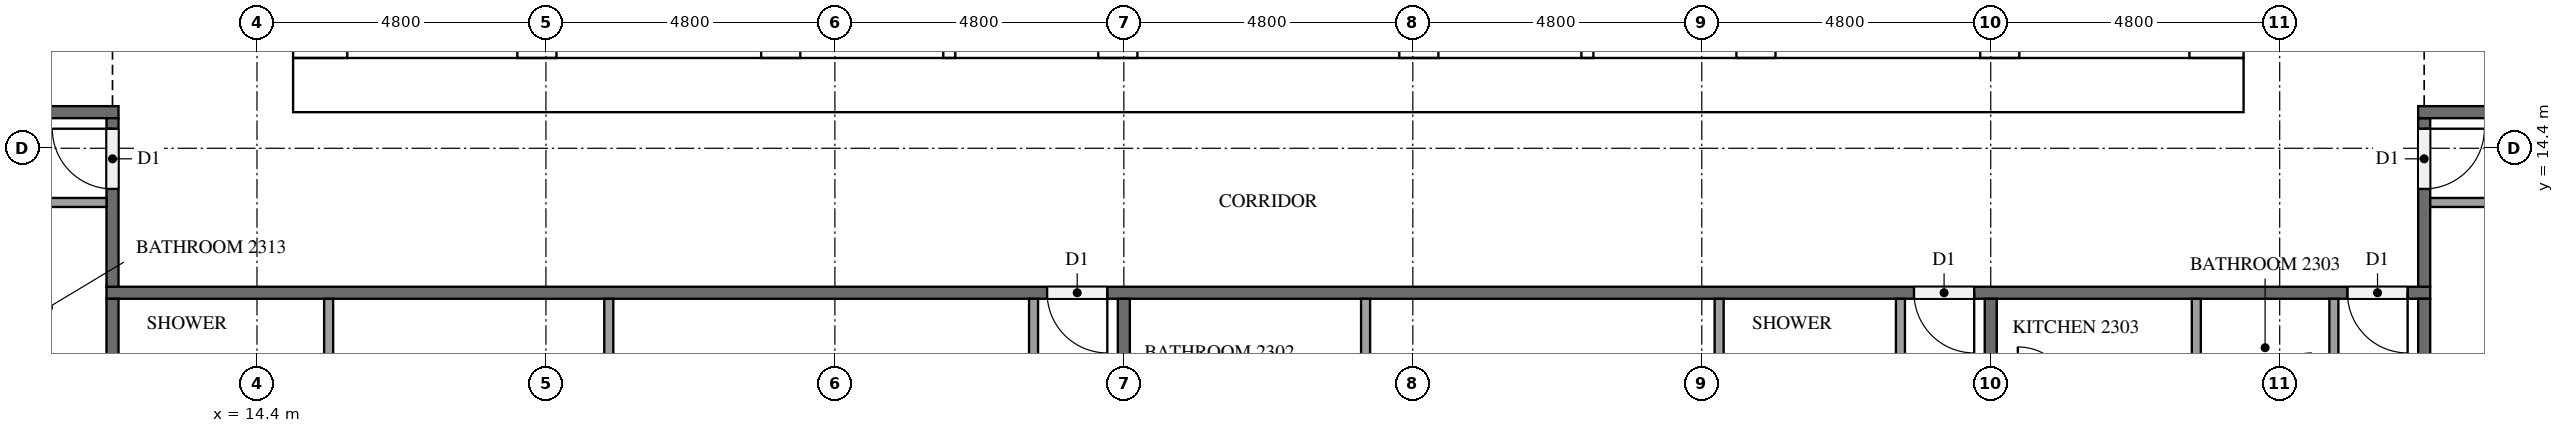
"""IFC4 building model, lengths in metres.
Left out: names, types, materials, properties, quantities, classifications, styles, units other than length and angle.
Written with IfcOpenShell. Run it as: python <this file> out.ifc"""

import sys

from ifc_helpers import new_model, si_unit, direction, frame, frame_2d, origin, place, context, subcontext, project, spatial, rectangle, extrude, element, fill, save


model = new_model("IFC4")
c1 = context("Model", 3, precision=1e-05, world=origin(), true_north=direction((0.0, 1.0)))
c2 = subcontext(c1, "Body", "Model", "MODEL_VIEW")
j1 = project(units=[si_unit("LENGTHUNIT", "METRE"), si_unit("PLANEANGLEUNIT", "RADIAN")], contexts=[c1])
p1 = place(None, origin())
s1 = spatial("IfcSite", under=j1, at=p1, CompositionType="ELEMENT")
p2 = place(p1, origin())
s2 = spatial("IfcBuilding", under=s1, at=p2, CompositionType="ELEMENT")
p3 = place(p2, frame((0.0, 0.0, 92.7)))
s3 = spatial("IfcBuildingStorey", under=s2, at=p3, CompositionType="ELEMENT", Elevation=92.7)
p4 = place(p3, frame((15.0, 15.45, 0.0), z_axis=(0.0, 0.0, 1.0), x_axis=(1.0, 0.0, 0.0)))
e1 = element("IfcWall", 1, at=p4, inside=s3, PredefinedType="SHEAR", context=c2, shape_type="SweptSolid", body=[
    extrude(rectangle(XDim=32.4, YDim=0.9, at=frame_2d((16.2, 0.0))), origin(), (0.0, 0.0, 1.0), 3.2),
])
p5 = place(p4, frame((15.3, 0.0, 0.0)))
e2 = element("IfcOpeningElement", 2, at=p5, cuts=e1, PredefinedType="OPENING", context=c2, shape_type="SweptSolid", body=[
    extrude(rectangle(XDim=1.8, YDim=2.1, at=frame_2d((0.9, 1.05))), frame((0.0, 0.46, 0.0), z_axis=(0.0, -1.0, 0.0), x_axis=(1.0, 0.0, 0.0)), (0.0, 0.0, 1.0), 0.92),
])
p6 = place(p3, frame((15.45, 15.9, 0.0), z_axis=(0.0, 0.0, 1.0), x_axis=(0.0, 1.0, 0.0)))
e3 = element("IfcWall", 3, at=p6, inside=s3, PredefinedType="SHEAR", context=c2, shape_type="SweptSolid", body=[
    extrude(rectangle(XDim=21.0, YDim=0.9, at=frame_2d((10.5, 0.0))), origin(), (0.0, 0.0, 1.0), 3.2),
])
p7 = place(p6, frame((4.86, 0.0, 0.0)))
e4 = element("IfcOpeningElement", 4, at=p7, cuts=e3, PredefinedType="OPENING", context=c2, shape_type="SweptSolid", body=[
    extrude(rectangle(XDim=1.2, YDim=2.1, at=frame_2d((0.6, 1.05))), frame((0.0, 0.46, 0.0), z_axis=(0.0, -1.0, 0.0), x_axis=(1.0, 0.0, 0.0)), (0.0, 0.0, 1.0), 0.92),
])
p8 = place(p3, frame((46.95, 15.9, 0.0), z_axis=(0.0, 0.0, 1.0), x_axis=(0.0, 1.0, 0.0)))
e5 = element("IfcWall", 5, at=p8, inside=s3, PredefinedType="SHEAR", context=c2, shape_type="SweptSolid", body=[
    extrude(rectangle(XDim=21.0, YDim=0.9, at=frame_2d((10.5, 0.0))), origin(), (0.0, 0.0, 1.0), 3.2),
])
p9 = place(p8, frame((10.2, 0.0, 0.0)))
e6 = element("IfcOpeningElement", 6, at=p9, cuts=e5, PredefinedType="OPENING", context=c2, shape_type="SweptSolid", body=[
    extrude(rectangle(XDim=1.2, YDim=2.1, at=frame_2d((0.6, 1.05))), frame((0.0, 0.46, 0.0), z_axis=(0.0, -1.0, 0.0), x_axis=(1.0, 0.0, 0.0)), (0.0, 0.0, 1.0), 0.92),
])
p10 = place(p3, frame((19.05, 15.9, 0.0), z_axis=(0.0, 0.0, 1.0), x_axis=(0.0, 1.0, 0.0)))
e7 = element("IfcWall", 7, at=p10, inside=s3, PredefinedType="SHEAR", context=c2, shape_type="SweptSolid", body=[
    extrude(rectangle(XDim=15.025, YDim=0.65, at=frame_2d((7.513, 0.0))), origin(), (0.0, 0.0, 1.0), 3.2),
])
p11 = place(p10, frame((9.55, 0.0, 0.0)))
e8 = element("IfcOpeningElement", 8, at=p11, cuts=e7, PredefinedType="OPENING", context=c2, shape_type="SweptSolid", body=[
    extrude(rectangle(XDim=1.1, YDim=2.1, at=frame_2d((0.55, 1.05))), frame((0.0, 0.335, 0.0), z_axis=(0.0, -1.0, 0.0), x_axis=(1.0, 0.0, 0.0)), (0.0, 0.0, 1.0), 0.67),
])
p12 = place(p10, frame((13.05, 0.0, 0.0)))
e9 = element("IfcOpeningElement", 9, at=p12, cuts=e7, PredefinedType="OPENING", context=c2, shape_type="SweptSolid", body=[
    extrude(rectangle(XDim=1.1, YDim=2.1, at=frame_2d((0.55, 1.05))), frame((0.0, 0.335, 0.0), z_axis=(0.0, -1.0, 0.0), x_axis=(1.0, 0.0, 0.0)), (0.0, 0.0, 1.0), 0.67),
])
p13 = place(p10, frame((0.3, 0.0, 0.0)))
e10 = element("IfcOpeningElement", 10, at=p13, cuts=e7, PredefinedType="OPENING", context=c2, shape_type="SweptSolid", body=[
    extrude(rectangle(XDim=1.2, YDim=2.1, at=frame_2d((0.6, 1.05))), frame((0.0, 0.335, 0.0), z_axis=(0.0, -1.0, 0.0), x_axis=(1.0, 0.0, 0.0)), (0.0, 0.0, 1.0), 0.67),
])
p14 = place(p3, frame((23.1, 15.9, 0.0), z_axis=(0.0, 0.0, 1.0), x_axis=(0.0, 1.0, 0.0)))
e11 = element("IfcWall", 11, at=p14, inside=s3, PredefinedType="SHEAR", context=c2, shape_type="SweptSolid", body=[
    extrude(rectangle(XDim=21.0, YDim=0.65, at=frame_2d((10.5, 0.0))), origin(), (0.0, 0.0, 1.0), 3.2),
])
p15 = place(p3, frame((39.3, 15.9, 0.0), z_axis=(0.0, 0.0, 1.0), x_axis=(0.0, 1.0, 0.0)))
e12 = element("IfcWall", 12, at=p15, inside=s3, PredefinedType="SHEAR", context=c2, shape_type="SweptSolid", body=[
    extrude(rectangle(XDim=8.35, YDim=0.65, at=frame_2d((4.175, 0.0))), origin(), (0.0, 0.0, 1.0), 3.2),
])
p16 = place(p3, frame((43.35, 15.9, 0.0), z_axis=(0.0, 0.0, 1.0), x_axis=(0.0, 1.0, 0.0)))
e13 = element("IfcWall", 13, at=p16, inside=s3, PredefinedType="SHEAR", context=c2, shape_type="SweptSolid", body=[
    extrude(rectangle(XDim=8.35, YDim=0.65, at=frame_2d((4.175, 0.0))), origin(), (0.0, 0.0, 1.0), 3.2),
])
p17 = place(p16, frame((0.3, 0.0, 0.0)))
e14 = element("IfcOpeningElement", 14, at=p17, cuts=e13, PredefinedType="OPENING", context=c2, shape_type="SweptSolid", body=[
    extrude(rectangle(XDim=1.2, YDim=2.1, at=frame_2d((0.6, 1.05))), frame((0.0, 0.335, 0.0), z_axis=(0.0, -1.0, 0.0), x_axis=(1.0, 0.0, 0.0)), (0.0, 0.0, 1.0), 0.67),
])
for number, where, z_axis, x_axis in (
    (15, (28.7, 15.9, 0.0), (0.0, 0.0, 1.0), (0.0, 1.0, 0.0)),
    (16, (33.7, 15.9, 0.0), (0.0, 0.0, 1.0), (0.0, 1.0, 0.0)),
):
    element("IfcWall", number, at=place(p3, frame(where, z_axis=z_axis, x_axis=x_axis)), inside=s3, PredefinedType="SHEAR", context=c2, shape_type="SweptSolid", body=[
        extrude(rectangle(XDim=2.525, YDim=0.65, at=frame_2d((1.263, 0.0))), origin(), (0.0, 0.0, 1.0), 3.2),
    ])
for number, where, z_axis, x_axis in (
    (17, (25.9, 15.9, 0.0), (0.0, 0.0, 1.0), (0.0, 1.0, 0.0)),
    (18, (36.5, 15.9, 0.0), (0.0, 0.0, 1.0), (0.0, 1.0, 0.0)),
):
    element("IfcWall", number, at=place(p3, frame(where, z_axis=z_axis, x_axis=x_axis)), inside=s3, PredefinedType="SOLIDWALL", context=c2, shape_type="SweptSolid", body=[
        extrude(rectangle(XDim=2.525, YDim=0.2, at=frame_2d((1.263, 0.0))), origin(), (0.0, 0.0, 1.0), 3.2),
    ])
p18 = place(p3, frame((50.5, 12.0, 0.0), z_axis=(0.0, 0.0, 1.0), x_axis=(-1.0, 0.0, 0.0)))
e19 = element("IfcWall", 19, at=p18, inside=s3, PredefinedType="PARTITIONING", context=c2, shape_type="SweptSolid", body=[
    extrude(rectangle(XDim=38.6, YDim=0.2, at=frame_2d((19.3, 0.0))), origin(), (0.0, 0.0, 1.0), 3.2),
])
p19 = place(p18, frame((21.975, 0.0, 0.0)))
e20 = element("IfcOpeningElement", 20, at=p19, cuts=e19, PredefinedType="OPENING", context=c2, shape_type="SweptSolid", body=[
    extrude(rectangle(XDim=1.0, YDim=2.1, at=frame_2d((0.5, 1.05))), frame((0.0, 0.11, 0.0), z_axis=(0.0, -1.0, 0.0), x_axis=(1.0, 0.0, 0.0)), (0.0, 0.0, 1.0), 0.22),
])
p20 = place(p18, frame((7.575, 0.0, 0.0)))
e21 = element("IfcOpeningElement", 21, at=p20, cuts=e19, PredefinedType="OPENING", context=c2, shape_type="SweptSolid", body=[
    extrude(rectangle(XDim=1.0, YDim=2.1, at=frame_2d((0.5, 1.05))), frame((0.0, 0.11, 0.0), z_axis=(0.0, -1.0, 0.0), x_axis=(1.0, 0.0, 0.0)), (0.0, 0.0, 1.0), 0.22),
])
p21 = place(p18, frame((0.375, 0.0, 0.0)))
e22 = element("IfcOpeningElement", 22, at=p21, cuts=e19, PredefinedType="OPENING", context=c2, shape_type="SweptSolid", body=[
    extrude(rectangle(XDim=1.0, YDim=2.1, at=frame_2d((0.5, 1.05))), frame((0.0, 0.11, 0.0), z_axis=(0.0, -1.0, 0.0), x_axis=(1.0, 0.0, 0.0)), (0.0, 0.0, 1.0), 0.22),
])
p22 = place(p3, frame((50.4, 14.9, 0.0), z_axis=(0.0, 0.0, 1.0), x_axis=(0.0, -1.0, 0.0)))
e23 = element("IfcWall", 23, at=p22, inside=s3, PredefinedType="PARTITIONING", context=c2, shape_type="SweptSolid", body=[
    extrude(rectangle(XDim=2.8, YDim=0.2, at=frame_2d((1.4, 0.0))), origin(), (0.0, 0.0, 1.0), 3.2),
])
p23 = place(p22, frame((0.175, 0.0, 0.0)))
e24 = element("IfcOpeningElement", 24, at=p23, cuts=e23, PredefinedType="OPENING", context=c2, shape_type="SweptSolid", body=[
    extrude(rectangle(XDim=1.0, YDim=2.1, at=frame_2d((0.5, 1.05))), frame((0.0, 0.11, 0.0), z_axis=(0.0, -1.0, 0.0), x_axis=(1.0, 0.0, 0.0)), (0.0, 0.0, 1.0), 0.22),
])
p24 = place(p3, frame((50.3, 15.0, 0.0), z_axis=(0.0, 0.0, 1.0), x_axis=(1.0, 0.0, 0.0)))
e25 = element("IfcWall", 25, at=p24, inside=s3, PredefinedType="PARTITIONING", context=c2, shape_type="SweptSolid", body=[
    extrude(rectangle(XDim=2.2, YDim=0.2, at=frame_2d((1.1, 0.0))), origin(), (0.0, 0.0, 1.0), 3.2),
])
p25 = place(p3, frame((9.9, 15.0, 0.0), z_axis=(0.0, 0.0, 1.0), x_axis=(1.0, 0.0, 0.0)))
e26 = element("IfcWall", 26, at=p25, inside=s3, PredefinedType="PARTITIONING", context=c2, shape_type="SweptSolid", body=[
    extrude(rectangle(XDim=2.2, YDim=0.2, at=frame_2d((1.1, 0.0))), origin(), (0.0, 0.0, 1.0), 3.2),
])
p26 = place(p3, frame((12.0, 12.1, 0.0), z_axis=(0.0, 0.0, 1.0), x_axis=(0.0, 1.0, 0.0)))
e27 = element("IfcWall", 27, at=p26, inside=s3, PredefinedType="PARTITIONING", context=c2, shape_type="SweptSolid", body=[
    extrude(rectangle(XDim=2.8, YDim=0.2, at=frame_2d((1.4, 0.0))), origin(), (0.0, 0.0, 1.0), 3.2),
])
p27 = place(p26, frame((1.625, 0.0, 0.0)))
e28 = element("IfcOpeningElement", 28, at=p27, cuts=e27, PredefinedType="OPENING", context=c2, shape_type="SweptSolid", body=[
    extrude(rectangle(XDim=1.0, YDim=2.1, at=frame_2d((0.5, 1.05))), frame((0.0, 0.11, 0.0), z_axis=(0.0, -1.0, 0.0), x_axis=(1.0, 0.0, 0.0)), (0.0, 0.0, 1.0), 0.22),
])
p28 = place(p3, frame((28.8, 11.9, 0.0), z_axis=(0.0, 0.0, 1.0), x_axis=(0.0, -1.0, 0.0)))
e29 = element("IfcWall", 29, at=p28, inside=s3, PredefinedType="PARTITIONING", context=c2, shape_type="SweptSolid", body=[
    extrude(rectangle(XDim=6.675, YDim=0.2, at=frame_2d((3.337, 0.0))), origin(), (0.0, 0.0, 1.0), 3.2),
])
for number, where, z_axis, x_axis in (
    (30, (12.0, 4.9, 0.0), (0.0, 0.0, 1.0), (0.0, 1.0, 0.0)),
    (31, (43.2, 11.9, 0.0), (0.0, 0.0, 1.0), (0.0, -1.0, 0.0)),
    (32, (50.4, 11.9, 0.0), (0.0, 0.0, 1.0), (0.0, -1.0, 0.0)),
):
    element("IfcWall", number, at=place(p3, frame(where, z_axis=z_axis, x_axis=x_axis)), inside=s3, PredefinedType="PARTITIONING", context=c2, shape_type="SweptSolid", body=[
        extrude(rectangle(XDim=7.0, YDim=0.2, at=frame_2d((3.5, 0.0))), origin(), (0.0, 0.0, 1.0), 3.2),
    ])
for number, where, z_axis, x_axis in (
    (33, (20.244, 11.9, 0.0), (0.0, 0.0, 1.0), (0.0, -1.0, 0.0)),
    (34, (15.59, 11.9, 0.0), (0.0, 0.0, 1.0), (0.0, -1.0, 0.0)),
):
    element("IfcWall", number, at=place(p3, frame(where, z_axis=z_axis, x_axis=x_axis)), inside=s3, PredefinedType="PARTITIONING", context=c2, shape_type="SweptSolid", body=[
        extrude(rectangle(XDim=2.225, YDim=0.15, at=frame_2d((1.112, 0.0))), origin(), (0.0, 0.0, 1.0), 3.2),
    ])
p29 = place(p3, frame((27.3, 11.9, 0.0), z_axis=(0.0, 0.0, 1.0), x_axis=(0.0, -1.0, 0.0)))
e35 = element("IfcWall", 35, at=p29, inside=s3, PredefinedType="PARTITIONING", context=c2, shape_type="SweptSolid", body=[
    extrude(rectangle(XDim=2.375, YDim=0.15, at=frame_2d((1.188, 0.0))), origin(), (0.0, 0.0, 1.0), 3.2),
])
for number, where, z_axis, x_axis in (
    (36, (38.688, 11.9, 0.0), (0.0, 0.0, 1.0), (0.0, -1.0, 0.0)),
    (37, (32.815, 11.9, 0.0), (0.0, 0.0, 1.0), (0.0, -1.0, 0.0)),
):
    element("IfcWall", number, at=place(p3, frame(where, z_axis=z_axis, x_axis=x_axis)), inside=s3, PredefinedType="PARTITIONING", context=c2, shape_type="SweptSolid", body=[
        extrude(rectangle(XDim=2.225, YDim=0.15, at=frame_2d((1.112, 0.0))), origin(), (0.0, 0.0, 1.0), 3.2),
    ])
p30 = place(p3, frame((41.7, 11.9, 0.0), z_axis=(0.0, 0.0, 1.0), x_axis=(0.0, -1.0, 0.0)))
e38 = element("IfcWall", 38, at=p30, inside=s3, PredefinedType="PARTITIONING", context=c2, shape_type="SweptSolid", body=[
    extrude(rectangle(XDim=2.375, YDim=0.15, at=frame_2d((1.188, 0.0))), origin(), (0.0, 0.0, 1.0), 3.2),
])
p31 = place(p3, frame((46.615, 11.9, 0.0), z_axis=(0.0, 0.0, 1.0), x_axis=(0.0, -1.0, 0.0)))
e39 = element("IfcWall", 39, at=p31, inside=s3, PredefinedType="PARTITIONING", context=c2, shape_type="SweptSolid", body=[
    extrude(rectangle(XDim=1.625, YDim=0.15, at=frame_2d((0.812, 0.0))), origin(), (0.0, 0.0, 1.0), 3.2),
])
p32 = place(p3, frame((48.9, 11.9, 0.0), z_axis=(0.0, 0.0, 1.0), x_axis=(0.0, -1.0, 0.0)))
e40 = element("IfcWall", 40, at=p32, inside=s3, PredefinedType="PARTITIONING", context=c2, shape_type="SweptSolid", body=[
    extrude(rectangle(XDim=1.775, YDim=0.15, at=frame_2d((0.887, 0.0))), origin(), (0.0, 0.0, 1.0), 3.2),
])
p33 = place(p3, frame((50.5, 13.5, 0.0), z_axis=(0.0, 0.0, 1.0), x_axis=(1.0, 0.0, 0.0)))
e41 = element("IfcWall", 41, at=p33, inside=s3, PredefinedType="PARTITIONING", context=c2, shape_type="SweptSolid", body=[
    extrude(rectangle(XDim=3.125, YDim=0.15, at=frame_2d((1.562, 0.0))), origin(), (0.0, 0.0, 1.0), 3.2),
])
p34 = place(p3, frame((11.9, 13.5, 0.0), z_axis=(0.0, 0.0, 1.0), x_axis=(-1.0, 0.0, 0.0)))
e42 = element("IfcWall", 42, at=p34, inside=s3, PredefinedType="PARTITIONING", context=c2, shape_type="SweptSolid", body=[
    extrude(rectangle(XDim=2.075, YDim=0.15, at=frame_2d((1.038, 0.0))), origin(), (0.0, 0.0, 1.0), 3.2),
])
p35 = place(p5, frame((1.8, 0.0, 0.0), z_axis=(0.0, 0.0, 1.0), x_axis=(-1.0, 0.0, 0.0)))
e43 = element("IfcDoor", 43, at=p35, inside=s3, OperationType="DOUBLE_DOOR_SINGLE_SWING", PredefinedType="DOOR", context=c2, shape_type="SweptSolid", body=[
    extrude(rectangle(XDim=1.8, YDim=2.1, at=frame_2d((0.9, 1.05))), frame((0.0, 0.025, 0.0), z_axis=(0.0, -1.0, 0.0), x_axis=(1.0, 0.0, 0.0)), (0.0, 0.0, 1.0), 0.05),
])
fill(e2, e43)
p36 = place(p19, origin())
e44 = element("IfcDoor", 44, at=p36, inside=s3, OperationType="SINGLE_SWING_LEFT", PredefinedType="DOOR", context=c2, shape_type="SweptSolid", body=[
    extrude(rectangle(XDim=1.0, YDim=2.1, at=frame_2d((0.5, 1.05))), frame((0.0, 0.025, 0.0), z_axis=(0.0, -1.0, 0.0), x_axis=(1.0, 0.0, 0.0)), (0.0, 0.0, 1.0), 0.05),
])
fill(e20, e44)
p37 = place(p20, origin())
e45 = element("IfcDoor", 45, at=p37, inside=s3, OperationType="SINGLE_SWING_LEFT", PredefinedType="DOOR", context=c2, shape_type="SweptSolid", body=[
    extrude(rectangle(XDim=1.0, YDim=2.1, at=frame_2d((0.5, 1.05))), frame((0.0, 0.025, 0.0), z_axis=(0.0, -1.0, 0.0), x_axis=(1.0, 0.0, 0.0)), (0.0, 0.0, 1.0), 0.05),
])
fill(e21, e45)
p38 = place(p21, origin())
e46 = element("IfcDoor", 46, at=p38, inside=s3, OperationType="SINGLE_SWING_LEFT", PredefinedType="DOOR", context=c2, shape_type="SweptSolid", body=[
    extrude(rectangle(XDim=1.0, YDim=2.1, at=frame_2d((0.5, 1.05))), frame((0.0, 0.025, 0.0), z_axis=(0.0, -1.0, 0.0), x_axis=(1.0, 0.0, 0.0)), (0.0, 0.0, 1.0), 0.05),
])
fill(e22, e46)
p39 = place(p23, origin())
e47 = element("IfcDoor", 47, at=p39, inside=s3, OperationType="SINGLE_SWING_LEFT", PredefinedType="DOOR", context=c2, shape_type="SweptSolid", body=[
    extrude(rectangle(XDim=1.0, YDim=2.1, at=frame_2d((0.5, 1.05))), frame((0.0, 0.025, 0.0), z_axis=(0.0, -1.0, 0.0), x_axis=(1.0, 0.0, 0.0)), (0.0, 0.0, 1.0), 0.05),
])
fill(e24, e47)
p40 = place(p27, origin())
e48 = element("IfcDoor", 48, at=p40, inside=s3, OperationType="SINGLE_SWING_RIGHT", PredefinedType="DOOR", context=c2, shape_type="SweptSolid", body=[
    extrude(rectangle(XDim=1.0, YDim=2.1, at=frame_2d((0.5, 1.05))), frame((0.0, 0.025, 0.0), z_axis=(0.0, -1.0, 0.0), x_axis=(1.0, 0.0, 0.0)), (0.0, 0.0, 1.0), 0.05),
])
fill(e28, e48)
save(model, sys.argv[1])
